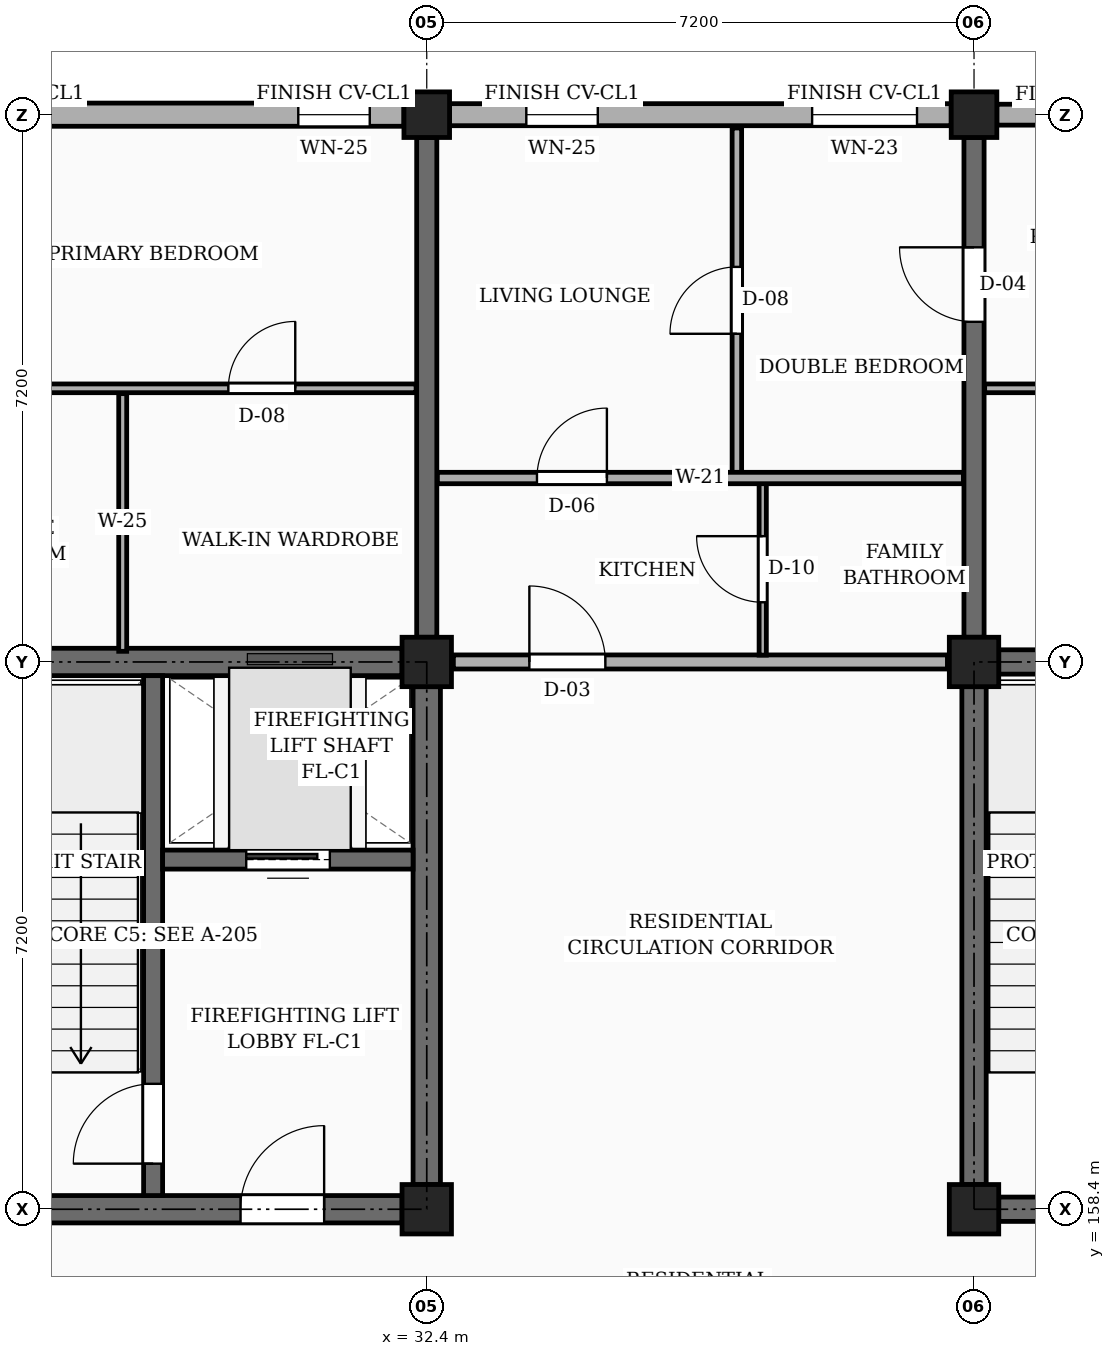
"""IFC4 building model, lengths in metres.
Left out: names, types, materials, properties, quantities, classifications, styles, units other than length and angle.
Written with IfcOpenShell. Run it as: python <this file> out.ifc"""

import sys

from ifc_helpers import new_model, si_unit, direction, frame, frame_2d, origin, origin_2d, place, context, subcontext, project, spatial, rectangle, extrude, element, fill, save


model = new_model("IFC4")
c1 = context("Model", 3, precision=1e-05, world=origin(), true_north=direction((0.0, 1.0)))
c2 = subcontext(c1, "Body", "Model", "MODEL_VIEW")
j1 = project(units=[si_unit("LENGTHUNIT", "METRE"), si_unit("PLANEANGLEUNIT", "RADIAN")], contexts=[c1])
p1 = place(None, origin())
s1 = spatial("IfcSite", under=j1, at=p1, CompositionType="ELEMENT")
p2 = place(p1, origin())
s2 = spatial("IfcBuilding", under=s1, at=p2, CompositionType="ELEMENT")
p3 = place(p2, origin())
s3 = spatial("IfcBuildingStorey", under=s2, at=p3, CompositionType="ELEMENT", Elevation=0.0)
for number, where, z_axis, x_axis in (
    (1, (32.4, 158.4, 0.0), (0.0, 0.0, 1.0), (1.0, 0.0, 0.0)),
    (2, (32.4, 165.6, 0.0), (0.0, 0.0, 1.0), (1.0, 0.0, 0.0)),
):
    element("IfcColumn", number, at=place(p3, frame(where, z_axis=z_axis, x_axis=x_axis)), inside=s3, PredefinedType="COLUMN", context=c2, shape_type="SweptSolid", body=[
        extrude(rectangle(XDim=0.65, YDim=0.65, at=origin_2d()), origin(), (0.0, 0.0, 1.0), 4.5),
    ])
p4 = place(p3, frame((32.4, 172.8, 0.0), z_axis=(0.0, 0.0, 1.0), x_axis=(1.0, 0.0, 0.0)))
e3 = element("IfcColumn", 3, at=p4, inside=s3, PredefinedType="COLUMN", context=c2, shape_type="SweptSolid", body=[
    extrude(rectangle(XDim=0.6, YDim=0.6, at=origin_2d()), origin(), (0.0, 0.0, 1.0), 4.5),
])
for number, where, z_axis, x_axis in (
    (4, (39.6, 158.4, 0.0), (0.0, 0.0, 1.0), (1.0, 0.0, 0.0)),
    (5, (39.6, 165.6, 0.0), (0.0, 0.0, 1.0), (1.0, 0.0, 0.0)),
):
    element("IfcColumn", number, at=place(p3, frame(where, z_axis=z_axis, x_axis=x_axis)), inside=s3, PredefinedType="COLUMN", context=c2, shape_type="SweptSolid", body=[
        extrude(rectangle(XDim=0.65, YDim=0.65, at=origin_2d()), origin(), (0.0, 0.0, 1.0), 4.5),
    ])
p5 = place(p3, frame((39.6, 172.8, 0.0), z_axis=(0.0, 0.0, 1.0), x_axis=(1.0, 0.0, 0.0)))
e6 = element("IfcColumn", 6, at=p5, inside=s3, PredefinedType="COLUMN", context=c2, shape_type="SweptSolid", body=[
    extrude(rectangle(XDim=0.6, YDim=0.6, at=origin_2d()), origin(), (0.0, 0.0, 1.0), 4.5),
])
p6 = place(p3, frame((32.4, 165.925, 0.0), z_axis=(0.0, 0.0, 1.0), x_axis=(0.0, 1.0, 0.0)))
e7 = element("IfcWall", 7, at=p6, inside=s3, PredefinedType="SOLIDWALL", context=c2, shape_type="SweptSolid", body=[
    extrude(rectangle(XDim=6.575, YDim=0.265, at=frame_2d((3.288, 0.0))), origin(), (0.0, 0.0, 1.0), 3.535),
])
p7 = place(p3, frame((39.6, 165.925, 0.0), z_axis=(0.0, 0.0, 1.0), x_axis=(0.0, 1.0, 0.0)))
e8 = element("IfcWall", 8, at=p7, inside=s3, PredefinedType="SOLIDWALL", context=c2, shape_type="SweptSolid", body=[
    extrude(rectangle(XDim=6.575, YDim=0.265, at=frame_2d((3.288, 0.0))), origin(), (0.0, 0.0, 1.0), 3.535),
])
p8 = place(p7, frame((4.15, 0.0, 0.0)))
e9 = element("IfcOpeningElement", 9, at=p8, cuts=e8, PredefinedType="OPENING", context=c2, shape_type="SweptSolid", body=[
    extrude(rectangle(XDim=0.98, YDim=2.12, at=frame_2d((0.49, 1.06))), frame((0.0, 0.143, 0.0), z_axis=(0.0, -1.0, 0.0), x_axis=(1.0, 0.0, 0.0)), (0.0, 0.0, 1.0), 0.285),
])
p9 = place(p3, frame((46.5, 172.8, 0.0), z_axis=(0.0, 0.0, 1.0), x_axis=(-1.0, 0.0, 0.0)))
e10 = element("IfcWall", 10, at=p9, inside=s3, PredefinedType="SOLIDWALL", context=c2, shape_type="SweptSolid", body=[
    extrude(rectangle(XDim=6.6, YDim=0.275, at=frame_2d((3.3, 0.0))), origin(), (0.0, 0.0, 1.0), 3.805),
])
p10 = place(p9, frame((0.45, 0.0, 0.78)))
e11 = element("IfcOpeningElement", 11, at=p10, cuts=e10, PredefinedType="OPENING", context=c2, shape_type="SweptSolid", body=[
    extrude(rectangle(XDim=1.22, YDim=1.36, at=frame_2d((0.61, 0.68))), frame((0.0, 0.147, 0.0), z_axis=(0.0, -1.0, 0.0), x_axis=(1.0, 0.0, 0.0)), (0.0, 0.0, 1.0), 0.295),
])
p11 = place(p9, frame((4.65, 0.0, 0.78)))
e12 = element("IfcOpeningElement", 12, at=p11, cuts=e10, PredefinedType="OPENING", context=c2, shape_type="SweptSolid", body=[
    extrude(rectangle(XDim=1.38, YDim=1.36, at=frame_2d((0.69, 0.68))), frame((0.0, 0.147, 0.0), z_axis=(0.0, -1.0, 0.0), x_axis=(1.0, 0.0, 0.0)), (0.0, 0.0, 1.0), 0.295),
])
p12 = place(p3, frame((39.3, 172.8, 0.0), z_axis=(0.0, 0.0, 1.0), x_axis=(-1.0, 0.0, 0.0)))
e13 = element("IfcWall", 13, at=p12, inside=s3, PredefinedType="SOLIDWALL", context=c2, shape_type="SweptSolid", body=[
    extrude(rectangle(XDim=6.6, YDim=0.29, at=frame_2d((3.3, 0.0))), origin(), (0.0, 0.0, 1.0), 3.805),
])
p13 = place(p12, frame((0.45, 0.0, 0.78)))
e14 = element("IfcOpeningElement", 14, at=p13, cuts=e13, PredefinedType="OPENING", context=c2, shape_type="SweptSolid", body=[
    extrude(rectangle(XDim=1.38, YDim=1.36, at=frame_2d((0.69, 0.68))), frame((0.0, 0.155, 0.0), z_axis=(0.0, -1.0, 0.0), x_axis=(1.0, 0.0, 0.0)), (0.0, 0.0, 1.0), 0.31),
])
p14 = place(p12, frame((4.65, 0.0, 0.78)))
e15 = element("IfcOpeningElement", 15, at=p14, cuts=e13, PredefinedType="OPENING", context=c2, shape_type="SweptSolid", body=[
    extrude(rectangle(XDim=0.94, YDim=1.44, at=frame_2d((0.47, 0.72))), frame((0.0, 0.155, 0.0), z_axis=(0.0, -1.0, 0.0), x_axis=(1.0, 0.0, 0.0)), (0.0, 0.0, 1.0), 0.31),
])
p15 = place(p3, frame((32.1, 172.8, 0.0), z_axis=(0.0, 0.0, 1.0), x_axis=(-1.0, 0.0, 0.0)))
e16 = element("IfcWall", 16, at=p15, inside=s3, PredefinedType="SOLIDWALL", context=c2, shape_type="SweptSolid", body=[
    extrude(rectangle(XDim=6.64, YDim=0.305, at=frame_2d((3.32, 0.0))), origin(), (0.0, 0.0, 1.0), 3.805),
])
p16 = place(p15, frame((0.45, 0.0, 0.78)))
e17 = element("IfcOpeningElement", 17, at=p16, cuts=e16, PredefinedType="OPENING", context=c2, shape_type="SweptSolid", body=[
    extrude(rectangle(XDim=0.94, YDim=1.44, at=frame_2d((0.47, 0.72))), frame((0.0, 0.163, 0.0), z_axis=(0.0, -1.0, 0.0), x_axis=(1.0, 0.0, 0.0)), (0.0, 0.0, 1.0), 0.325),
])
p17 = place(p15, frame((4.65, 0.0, 0.78)))
e18 = element("IfcOpeningElement", 18, at=p17, cuts=e16, PredefinedType="OPENING", context=c2, shape_type="SweptSolid", body=[
    extrude(rectangle(XDim=1.15, YDim=1.44, at=frame_2d((0.575, 0.72))), frame((0.0, 0.163, 0.0), z_axis=(0.0, -1.0, 0.0), x_axis=(1.0, 0.0, 0.0)), (0.0, 0.0, 1.0), 0.325),
])
p18 = place(p3, frame((25.525, 165.6, 0.0), z_axis=(0.0, 0.0, 1.0), x_axis=(1.0, 0.0, 0.0)))
e19 = element("IfcWall", 19, at=p18, inside=s3, PredefinedType="SHEAR", context=c2, shape_type="SweptSolid", body=[
    extrude(rectangle(XDim=6.55, YDim=0.36, at=frame_2d((3.275, 0.0))), origin(), (0.0, 0.0, 1.0), 4.235),
])
p19 = place(p3, frame((32.4, 158.725, 0.0), z_axis=(0.0, 0.0, 1.0), x_axis=(0.0, 1.0, 0.0)))
e20 = element("IfcWall", 20, at=p19, inside=s3, PredefinedType="SHEAR", context=c2, shape_type="SweptSolid", body=[
    extrude(rectangle(XDim=6.55, YDim=0.36, at=frame_2d((3.275, 0.0))), origin(), (0.0, 0.0, 1.0), 4.235),
])
p20 = place(p3, frame((25.525, 158.4, 0.0), z_axis=(0.0, 0.0, 1.0), x_axis=(1.0, 0.0, 0.0)))
e21 = element("IfcWall", 21, at=p20, inside=s3, PredefinedType="SHEAR", context=c2, shape_type="SweptSolid", body=[
    extrude(rectangle(XDim=6.55, YDim=0.36, at=frame_2d((3.275, 0.0))), origin(), (0.0, 0.0, 1.0), 4.235),
])
p21 = place(p20, frame((4.425, 0.0, 0.0)))
e22 = element("IfcOpeningElement", 22, at=p21, cuts=e21, PredefinedType="OPENING", context=c2, shape_type="SweptSolid", body=[
    extrude(rectangle(XDim=1.1, YDim=2.15, at=frame_2d((0.55, 1.075))), frame((0.0, 0.19, 0.0), z_axis=(0.0, -1.0, 0.0), x_axis=(1.0, 0.0, 0.0)), (0.0, 0.0, 1.0), 0.38),
])
p22 = place(p3, frame((28.8, 158.58, 0.0), z_axis=(0.0, 0.0, 1.0), x_axis=(0.0, 1.0, 0.0)))
e23 = element("IfcWall", 23, at=p22, inside=s3, PredefinedType="SHEAR", context=c2, shape_type="SweptSolid", body=[
    extrude(rectangle(XDim=6.84, YDim=0.25, at=frame_2d((3.42, 0.0))), origin(), (0.0, 0.0, 1.0), 4.235),
])
p23 = place(p22, frame((0.42, 0.0, 0.0)))
e24 = element("IfcOpeningElement", 24, at=p23, cuts=e23, PredefinedType="OPENING", context=c2, shape_type="SweptSolid", body=[
    extrude(rectangle(XDim=1.05, YDim=2.15, at=frame_2d((0.525, 1.075))), frame((0.0, 0.135, 0.0), z_axis=(0.0, -1.0, 0.0), x_axis=(1.0, 0.0, 0.0)), (0.0, 0.0, 1.0), 0.27),
])
p24 = place(p3, frame((28.925, 163.0, 0.0), z_axis=(0.0, 0.0, 1.0), x_axis=(1.0, 0.0, 0.0)))
e25 = element("IfcWall", 25, at=p24, inside=s3, PredefinedType="SHEAR", context=c2, shape_type="SweptSolid", body=[
    extrude(rectangle(XDim=3.295, YDim=0.25, at=frame_2d((1.647, 0.0))), origin(), (0.0, 0.0, 1.0), 4.235),
])
p25 = place(p24, frame((1.1, 0.0, 0.0)))
e26 = element("IfcOpeningElement", 26, at=p25, cuts=e25, PredefinedType="OPENING", context=c2, shape_type="SweptSolid", body=[
    extrude(rectangle(XDim=1.1, YDim=2.2, at=frame_2d((0.55, 1.1))), frame((0.0, 0.135, 0.0), z_axis=(0.0, -1.0, 0.0), x_axis=(1.0, 0.0, 0.0)), (0.0, 0.0, 1.0), 0.27),
])
p26 = place(p3, frame((39.6, 158.725, 0.0), z_axis=(0.0, 0.0, 1.0), x_axis=(0.0, 1.0, 0.0)))
e27 = element("IfcWall", 27, at=p26, inside=s3, PredefinedType="SHEAR", context=c2, shape_type="SweptSolid", body=[
    extrude(rectangle(XDim=6.55, YDim=0.32, at=frame_2d((3.275, 0.0))), origin(), (0.0, 0.0, 1.0), 4.235),
])
p27 = place(p3, frame((39.925, 165.6, 0.0), z_axis=(0.0, 0.0, 1.0), x_axis=(1.0, 0.0, 0.0)))
e28 = element("IfcWall", 28, at=p27, inside=s3, PredefinedType="SHEAR", context=c2, shape_type="SweptSolid", body=[
    extrude(rectangle(XDim=6.55, YDim=0.32, at=frame_2d((3.275, 0.0))), origin(), (0.0, 0.0, 1.0), 4.235),
])
p28 = place(p3, frame((39.925, 158.4, 0.0), z_axis=(0.0, 0.0, 1.0), x_axis=(1.0, 0.0, 0.0)))
e29 = element("IfcWall", 29, at=p28, inside=s3, PredefinedType="SHEAR", context=c2, shape_type="SweptSolid", body=[
    extrude(rectangle(XDim=6.55, YDim=0.32, at=frame_2d((3.275, 0.0))), origin(), (0.0, 0.0, 1.0), 4.235),
])
p29 = place(p28, frame((4.425, 0.0, 0.0)))
e30 = element("IfcOpeningElement", 30, at=p29, cuts=e29, PredefinedType="OPENING", context=c2, shape_type="SweptSolid", body=[
    extrude(rectangle(XDim=1.1, YDim=2.15, at=frame_2d((0.55, 1.075))), frame((0.0, 0.17, 0.0), z_axis=(0.0, -1.0, 0.0), x_axis=(1.0, 0.0, 0.0)), (0.0, 0.0, 1.0), 0.34),
])
p30 = place(p3, frame((32.75, 165.6, 0.0), z_axis=(0.0, 0.0, 1.0), x_axis=(1.0, 0.0, 0.0)))
e31 = element("IfcWall", 31, at=p30, inside=s3, PredefinedType="PARTITIONING", context=c2, shape_type="SweptSolid", body=[
    extrude(rectangle(XDim=6.5, YDim=0.185, at=frame_2d((3.25, 0.0))), origin(), (0.0, 0.0, 1.0), 3.435),
])
p31 = place(p30, frame((1.0, 0.0, 0.0)))
e32 = element("IfcOpeningElement", 32, at=p31, cuts=e31, PredefinedType="OPENING", context=c2, shape_type="SweptSolid", body=[
    extrude(rectangle(XDim=1.0, YDim=2.15, at=frame_2d((0.5, 1.075))), frame((0.0, 0.103, 0.0), z_axis=(0.0, -1.0, 0.0), x_axis=(1.0, 0.0, 0.0)), (0.0, 0.0, 1.0), 0.205),
])
p32 = place(p3, frame((25.34, 169.2, 0.0), z_axis=(0.0, 0.0, 1.0), x_axis=(1.0, 0.0, 0.0)))
e33 = element("IfcWall", 33, at=p32, inside=s3, PredefinedType="PARTITIONING", context=c2, shape_type="SweptSolid", body=[
    extrude(rectangle(XDim=6.92, YDim=0.115, at=frame_2d((3.46, 0.0))), origin(), (0.0, 0.0, 1.0), 3.67),
])
p33 = place(p32, frame((1.05, 0.0, 0.0)))
e34 = element("IfcOpeningElement", 34, at=p33, cuts=e33, PredefinedType="OPENING", context=c2, shape_type="SweptSolid", body=[
    extrude(rectangle(XDim=0.87, YDim=2.05, at=frame_2d((0.435, 1.025))), frame((0.0, 0.067, 0.0), z_axis=(0.0, -1.0, 0.0), x_axis=(1.0, 0.0, 0.0)), (0.0, 0.0, 1.0), 0.135),
])
p34 = place(p32, frame((4.45, 0.0, 0.0)))
e35 = element("IfcOpeningElement", 35, at=p34, cuts=e33, PredefinedType="OPENING", context=c2, shape_type="SweptSolid", body=[
    extrude(rectangle(XDim=0.88, YDim=2.08, at=frame_2d((0.44, 1.04))), frame((0.0, 0.067, 0.0), z_axis=(0.0, -1.0, 0.0), x_axis=(1.0, 0.0, 0.0)), (0.0, 0.0, 1.0), 0.135),
])
p35 = place(p3, frame((28.4, 165.74, 0.0), z_axis=(0.0, 0.0, 1.0), x_axis=(0.0, 1.0, 0.0)))
e36 = element("IfcWall", 36, at=p35, inside=s3, PredefinedType="PARTITIONING", context=c2, shape_type="SweptSolid", body=[
    extrude(rectangle(XDim=3.39, YDim=0.105, at=frame_2d((1.695, 0.0))), origin(), (0.0, 0.0, 1.0), 3.67),
])
p36 = place(p3, frame((36.48, 168.09, 0.0), z_axis=(0.0, 0.0, 1.0), x_axis=(0.0, 1.0, 0.0)))
e37 = element("IfcWall", 37, at=p36, inside=s3, PredefinedType="PARTITIONING", context=c2, shape_type="SweptSolid", body=[
    extrude(rectangle(XDim=4.535, YDim=0.125, at=frame_2d((2.268, 0.0))), origin(), (0.0, 0.0, 1.0), 3.67),
])
p37 = place(p36, frame((1.827, 0.0, 0.0)))
e38 = element("IfcOpeningElement", 38, at=p37, cuts=e37, PredefinedType="OPENING", context=c2, shape_type="SweptSolid", body=[
    extrude(rectangle(XDim=0.88, YDim=2.08, at=frame_2d((0.44, 1.04))), frame((0.0, 0.073, 0.0), z_axis=(0.0, -1.0, 0.0), x_axis=(1.0, 0.0, 0.0)), (0.0, 0.0, 1.0), 0.145),
])
p38 = place(p3, frame((36.82, 165.69, 0.0), z_axis=(0.0, 0.0, 1.0), x_axis=(0.0, 1.0, 0.0)))
e39 = element("IfcWall", 39, at=p38, inside=s3, PredefinedType="PARTITIONING", context=c2, shape_type="SweptSolid", body=[
    extrude(rectangle(XDim=2.26, YDim=0.095, at=frame_2d((1.13, 0.0))), origin(), (0.0, 0.0, 1.0), 3.67),
])
p39 = place(p38, frame((0.695, 0.0, 0.0)))
e40 = element("IfcOpeningElement", 40, at=p39, cuts=e39, PredefinedType="OPENING", context=c2, shape_type="SweptSolid", body=[
    extrude(rectangle(XDim=0.87, YDim=2.05, at=frame_2d((0.435, 1.025))), frame((0.0, 0.058, 0.0), z_axis=(0.0, -1.0, 0.0), x_axis=(1.0, 0.0, 0.0)), (0.0, 0.0, 1.0), 0.115),
])
p40 = place(p3, frame((32.54, 168.02, 0.0), z_axis=(0.0, 0.0, 1.0), x_axis=(1.0, 0.0, 0.0)))
e41 = element("IfcWall", 41, at=p40, inside=s3, PredefinedType="PARTITIONING", context=c2, shape_type="SweptSolid", body=[
    extrude(rectangle(XDim=6.92, YDim=0.15, at=frame_2d((3.46, 0.0))), origin(), (0.0, 0.0, 1.0), 3.67),
])
p41 = place(p40, frame((1.31, 0.0, 0.0)))
e42 = element("IfcOpeningElement", 42, at=p41, cuts=e41, PredefinedType="OPENING", context=c2, shape_type="SweptSolid", body=[
    extrude(rectangle(XDim=0.92, YDim=2.1, at=frame_2d((0.46, 1.05))), frame((0.0, 0.085, 0.0), z_axis=(0.0, -1.0, 0.0), x_axis=(1.0, 0.0, 0.0)), (0.0, 0.0, 1.0), 0.17),
])
p42 = place(p3, frame((39.74, 169.2, 0.0), z_axis=(0.0, 0.0, 1.0), x_axis=(1.0, 0.0, 0.0)))
e43 = element("IfcWall", 43, at=p42, inside=s3, PredefinedType="PARTITIONING", context=c2, shape_type="SweptSolid", body=[
    extrude(rectangle(XDim=6.92, YDim=0.115, at=frame_2d((3.46, 0.0))), origin(), (0.0, 0.0, 1.0), 3.67),
])
p43 = place(p42, frame((1.05, 0.0, 0.0)))
e44 = element("IfcOpeningElement", 44, at=p43, cuts=e43, PredefinedType="OPENING", context=c2, shape_type="SweptSolid", body=[
    extrude(rectangle(XDim=0.87, YDim=2.05, at=frame_2d((0.435, 1.025))), frame((0.0, 0.067, 0.0), z_axis=(0.0, -1.0, 0.0), x_axis=(1.0, 0.0, 0.0)), (0.0, 0.0, 1.0), 0.135),
])
p44 = place(p42, frame((4.45, 0.0, 0.0)))
e45 = element("IfcOpeningElement", 45, at=p44, cuts=e43, PredefinedType="OPENING", context=c2, shape_type="SweptSolid", body=[
    extrude(rectangle(XDim=0.88, YDim=2.08, at=frame_2d((0.44, 1.04))), frame((0.0, 0.067, 0.0), z_axis=(0.0, -1.0, 0.0), x_axis=(1.0, 0.0, 0.0)), (0.0, 0.0, 1.0), 0.135),
])
p45 = place(p13, origin())
e46 = element("IfcWindow", 46, at=p45, inside=s3, PartitioningType="SINGLE_PANEL", PredefinedType="WINDOW", context=c2, shape_type="SweptSolid", body=[
    extrude(rectangle(XDim=1.38, YDim=1.36, at=frame_2d((0.69, 0.68))), frame((0.0, 0.03, 0.0), z_axis=(0.0, -1.0, 0.0), x_axis=(1.0, 0.0, 0.0)), (0.0, 0.0, 1.0), 0.06),
])
fill(e14, e46)
p46 = place(p14, origin())
e47 = element("IfcWindow", 47, at=p46, inside=s3, PartitioningType="SINGLE_PANEL", PredefinedType="WINDOW", context=c2, shape_type="SweptSolid", body=[
    extrude(rectangle(XDim=0.94, YDim=1.44, at=frame_2d((0.47, 0.72))), frame((0.0, 0.03, 0.0), z_axis=(0.0, -1.0, 0.0), x_axis=(1.0, 0.0, 0.0)), (0.0, 0.0, 1.0), 0.06),
])
fill(e15, e47)
p47 = place(p16, origin())
e48 = element("IfcWindow", 48, at=p47, inside=s3, PartitioningType="SINGLE_PANEL", PredefinedType="WINDOW", context=c2, shape_type="SweptSolid", body=[
    extrude(rectangle(XDim=0.94, YDim=1.44, at=frame_2d((0.47, 0.72))), frame((0.0, 0.03, 0.0), z_axis=(0.0, -1.0, 0.0), x_axis=(1.0, 0.0, 0.0)), (0.0, 0.0, 1.0), 0.06),
])
fill(e17, e48)
p48 = place(p21, frame((1.1, 0.0, 0.0), z_axis=(0.0, 0.0, 1.0), x_axis=(-1.0, 0.0, 0.0)))
e49 = element("IfcDoor", 49, at=p48, inside=s3, OperationType="SINGLE_SWING_RIGHT", PredefinedType="DOOR", context=c2, shape_type="SweptSolid", body=[
    extrude(rectangle(XDim=1.1, YDim=2.15, at=frame_2d((0.55, 1.075))), frame((0.0, 0.025, 0.0), z_axis=(0.0, -1.0, 0.0), x_axis=(1.0, 0.0, 0.0)), (0.0, 0.0, 1.0), 0.05),
])
fill(e22, e49)
p49 = place(p23, frame((1.05, 0.0, 0.0), z_axis=(0.0, 0.0, 1.0), x_axis=(-1.0, 0.0, 0.0)))
e50 = element("IfcDoor", 50, at=p49, inside=s3, OperationType="SINGLE_SWING_LEFT", PredefinedType="DOOR", context=c2, shape_type="SweptSolid", body=[
    extrude(rectangle(XDim=1.05, YDim=2.15, at=frame_2d((0.525, 1.075))), frame((0.0, 0.025, 0.0), z_axis=(0.0, -1.0, 0.0), x_axis=(1.0, 0.0, 0.0)), (0.0, 0.0, 1.0), 0.05),
])
fill(e24, e50)
p50 = place(p25, origin())
e51 = element("IfcDoor", 51, at=p50, inside=s3, OperationType="SLIDING_TO_LEFT", PredefinedType="DOOR", context=c2, shape_type="SweptSolid", body=[
    extrude(rectangle(XDim=1.1, YDim=2.2, at=frame_2d((0.55, 1.1))), frame((0.0, 0.025, 0.0), z_axis=(0.0, -1.0, 0.0), x_axis=(1.0, 0.0, 0.0)), (0.0, 0.0, 1.0), 0.05),
])
fill(e26, e51)
p51 = place(p31, origin())
e52 = element("IfcDoor", 52, at=p51, inside=s3, OperationType="SINGLE_SWING_LEFT", PredefinedType="DOOR", context=c2, shape_type="SweptSolid", body=[
    extrude(rectangle(XDim=1.0, YDim=2.15, at=frame_2d((0.5, 1.075))), frame((0.0, 0.025, 0.0), z_axis=(0.0, -1.0, 0.0), x_axis=(1.0, 0.0, 0.0)), (0.0, 0.0, 1.0), 0.05),
])
fill(e32, e52)
p52 = place(p34, origin())
e53 = element("IfcDoor", 53, at=p52, inside=s3, OperationType="SINGLE_SWING_RIGHT", PredefinedType="DOOR", context=c2, shape_type="SweptSolid", body=[
    extrude(rectangle(XDim=0.88, YDim=2.08, at=frame_2d((0.44, 1.04))), frame((0.0, 0.025, 0.0), z_axis=(0.0, -1.0, 0.0), x_axis=(1.0, 0.0, 0.0)), (0.0, 0.0, 1.0), 0.05),
])
fill(e35, e53)
p53 = place(p37, origin())
e54 = element("IfcDoor", 54, at=p53, inside=s3, OperationType="SINGLE_SWING_LEFT", PredefinedType="DOOR", context=c2, shape_type="SweptSolid", body=[
    extrude(rectangle(XDim=0.88, YDim=2.08, at=frame_2d((0.44, 1.04))), frame((0.0, 0.025, 0.0), z_axis=(0.0, -1.0, 0.0), x_axis=(1.0, 0.0, 0.0)), (0.0, 0.0, 1.0), 0.05),
])
fill(e38, e54)
p54 = place(p39, origin())
e55 = element("IfcDoor", 55, at=p54, inside=s3, OperationType="SINGLE_SWING_RIGHT", PredefinedType="DOOR", context=c2, shape_type="SweptSolid", body=[
    extrude(rectangle(XDim=0.87, YDim=2.05, at=frame_2d((0.435, 1.025))), frame((0.0, 0.025, 0.0), z_axis=(0.0, -1.0, 0.0), x_axis=(1.0, 0.0, 0.0)), (0.0, 0.0, 1.0), 0.05),
])
fill(e40, e55)
p55 = place(p41, origin())
e56 = element("IfcDoor", 56, at=p55, inside=s3, OperationType="SINGLE_SWING_RIGHT", PredefinedType="DOOR", context=c2, shape_type="SweptSolid", body=[
    extrude(rectangle(XDim=0.92, YDim=2.1, at=frame_2d((0.46, 1.05))), frame((0.0, 0.025, 0.0), z_axis=(0.0, -1.0, 0.0), x_axis=(1.0, 0.0, 0.0)), (0.0, 0.0, 1.0), 0.05),
])
fill(e42, e56)
p56 = place(p8, origin())
e57 = element("IfcDoor", 57, at=p56, inside=s3, OperationType="SINGLE_SWING_RIGHT", PredefinedType="DOOR", context=c2, shape_type="SweptSolid", body=[
    extrude(rectangle(XDim=0.98, YDim=2.12, at=frame_2d((0.49, 1.06))), frame((0.0, 0.025, 0.0), z_axis=(0.0, -1.0, 0.0), x_axis=(1.0, 0.0, 0.0)), (0.0, 0.0, 1.0), 0.05),
])
fill(e9, e57)
save(model, sys.argv[1])
